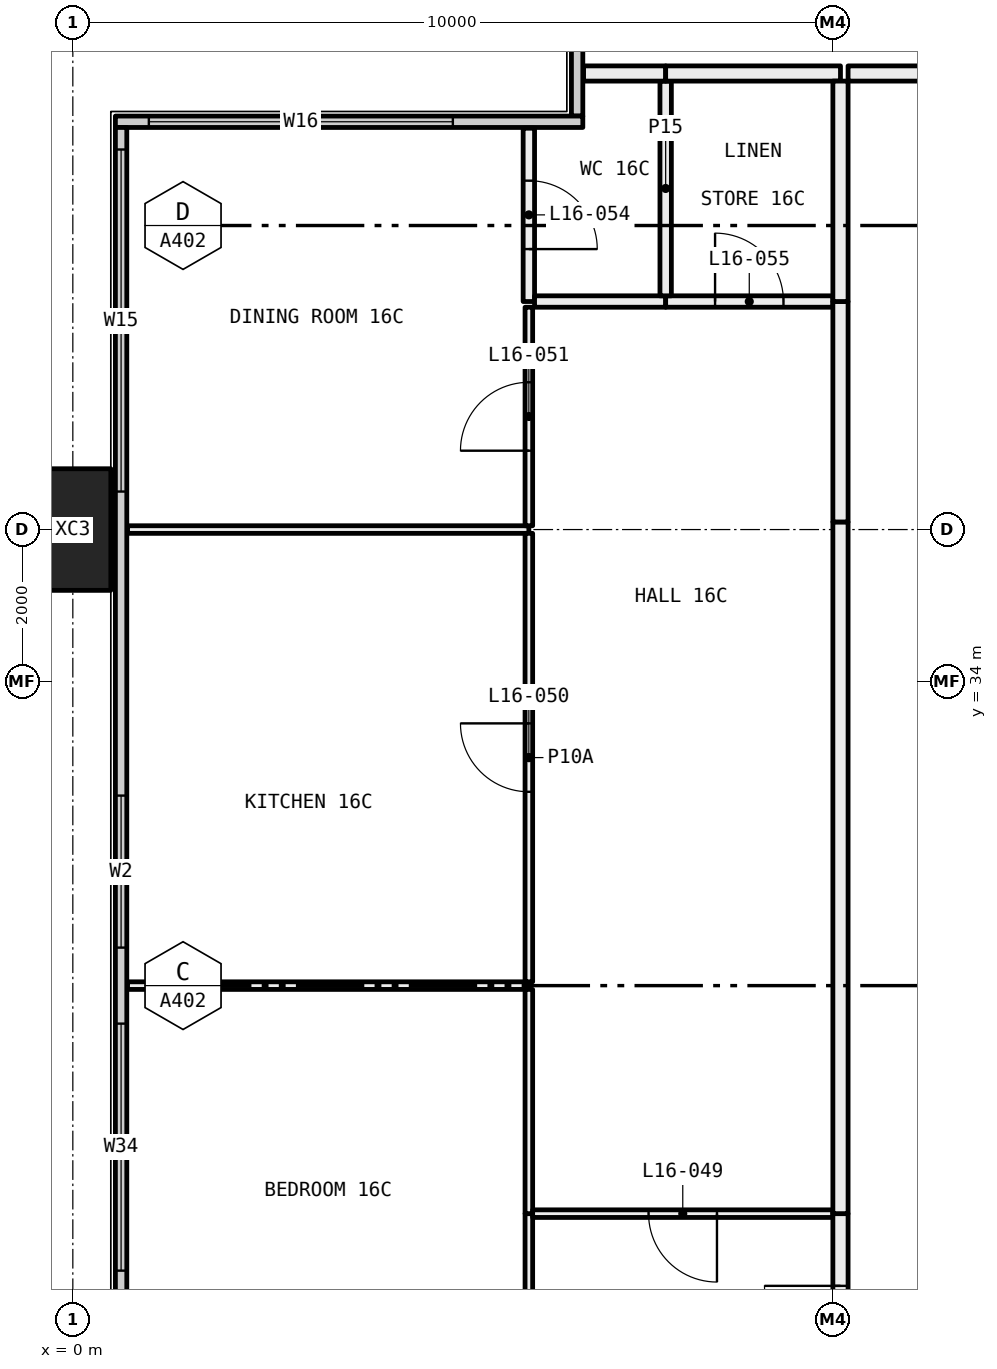
"""IFC4 building model, lengths in metres.
Left out: names, types, materials, properties, quantities, classifications, styles, units other than length and angle.
Written with IfcOpenShell. Run it as: python <this file> out.ifc"""

import sys

from ifc_helpers import new_model, si_unit, direction, frame, frame_2d, origin, origin_2d, place, context, subcontext, project, spatial, rectangle, hollow_rectangle, extrude, element, fill, save


model = new_model("IFC4")
c1 = context("Model", 3, precision=1e-05, world=origin(), true_north=direction((0.0, 1.0)))
c2 = subcontext(c1, "Body", "Model", "MODEL_VIEW")
j1 = project(units=[si_unit("LENGTHUNIT", "METRE"), si_unit("PLANEANGLEUNIT", "RADIAN")], contexts=[c1])
p1 = place(None, origin())
s1 = spatial("IfcSite", under=j1, at=p1, CompositionType="ELEMENT")
p2 = place(p1, origin())
s2 = spatial("IfcBuilding", under=s1, at=p2, CompositionType="ELEMENT")
p3 = place(p2, frame((0.0, 0.0, 67.95)))
s3 = spatial("IfcBuildingStorey", under=s2, at=p3, CompositionType="ELEMENT", Elevation=67.95)
p4 = place(p3, frame((0.0, 36.0, -0.4), z_axis=(0.0, 0.0, 1.0), x_axis=(0.0, 1.0, 0.0)))
e1 = element("IfcColumn", 1, at=p4, inside=s3, PredefinedType="COLUMN", context=c2, shape_type="SweptSolid", body=[
    extrude(hollow_rectangle(XDim=1.6, YDim=1.0, WallThickness=0.065, at=origin_2d()), origin(), (0.0, 0.0, 1.0), 3.45),
])
p5 = place(p3, frame((6.635, 41.44, 0.0), z_axis=(0.0, 0.0, 1.0), x_axis=(0.0, 1.0, 0.0)))
e2 = element("IfcWall", 2, at=p5, inside=s3, PredefinedType="ELEMENTEDWALL", context=c2, shape_type="SweptSolid", body=[
    extrude(rectangle(XDim=5.85, YDim=0.15, at=frame_2d((2.925, 0.0))), origin(), (0.0, 0.0, 1.0), 3.05),
])
p6 = place(p5, frame((1.56, 0.0, 0.45)))
e3 = element("IfcOpeningElement", 3, at=p6, cuts=e2, PredefinedType="OPENING", context=c2, shape_type="SweptSolid", body=[
    extrude(rectangle(XDim=4.0, YDim=2.55, at=frame_2d((2.0, 1.275))), frame((0.0, 0.085, 0.0), z_axis=(0.0, -1.0, 0.0), x_axis=(1.0, 0.0, 0.0)), (0.0, 0.0, 1.0), 0.17),
])
p7 = place(p3, frame((0.56, 41.365, 0.0), z_axis=(0.0, 0.0, 1.0), x_axis=(1.0, 0.0, 0.0)))
e4 = element("IfcWall", 4, at=p7, inside=s3, PredefinedType="ELEMENTEDWALL", context=c2, shape_type="SweptSolid", body=[
    extrude(rectangle(XDim=6.15, YDim=0.15, at=frame_2d((3.075, 0.0))), origin(), (0.0, 0.0, 1.0), 3.05),
])
p8 = place(p7, frame((0.44, 0.0, 0.45)))
e5 = element("IfcOpeningElement", 5, at=p8, cuts=e4, PredefinedType="OPENING", context=c2, shape_type="SweptSolid", body=[
    extrude(rectangle(XDim=4.0, YDim=2.55, at=frame_2d((2.0, 1.275))), frame((0.0, 0.085, 0.0), z_axis=(0.0, -1.0, 0.0), x_axis=(1.0, 0.0, 0.0)), (0.0, 0.0, 1.0), 0.17),
])
p9 = place(p3, frame((0.635, 6.71, 0.0), z_axis=(0.0, 0.0, 1.0), x_axis=(0.0, 1.0, 0.0)))
e6 = element("IfcWall", 6, at=p9, inside=s3, PredefinedType="ELEMENTEDWALL", context=c2, shape_type="SweptSolid", body=[
    extrude(rectangle(XDim=34.58, YDim=0.15, at=frame_2d((17.29, 0.0))), origin(), (0.0, 0.0, 1.0), 3.05),
])
p10 = place(p9, frame((0.29, 0.0, 0.45)))
e7 = element("IfcOpeningElement", 7, at=p10, cuts=e6, PredefinedType="OPENING", context=c2, shape_type="SweptSolid", body=[
    extrude(rectangle(XDim=4.5, YDim=2.55, at=frame_2d((2.25, 1.275))), frame((0.0, 0.085, 0.0), z_axis=(0.0, -1.0, 0.0), x_axis=(1.0, 0.0, 0.0)), (0.0, 0.0, 1.0), 0.17),
])
p11 = place(p9, frame((7.54, 0.0, 0.45)))
e8 = element("IfcOpeningElement", 8, at=p11, cuts=e6, PredefinedType="OPENING", context=c2, shape_type="SweptSolid", body=[
    extrude(rectangle(XDim=3.25, YDim=2.55, at=frame_2d((1.625, 1.275))), frame((0.0, 0.085, 0.0), z_axis=(0.0, -1.0, 0.0), x_axis=(1.0, 0.0, 0.0)), (0.0, 0.0, 1.0), 0.17),
])
p12 = place(p9, frame((11.79, 0.0, 0.45)))
e9 = element("IfcOpeningElement", 9, at=p12, cuts=e6, PredefinedType="OPENING", context=c2, shape_type="SweptSolid", body=[
    extrude(rectangle(XDim=3.25, YDim=2.55, at=frame_2d((1.625, 1.275))), frame((0.0, 0.085, 0.0), z_axis=(0.0, -1.0, 0.0), x_axis=(1.0, 0.0, 0.0)), (0.0, 0.0, 1.0), 0.17),
])
p13 = place(p9, frame((19.54, 0.0, 0.45)))
e10 = element("IfcOpeningElement", 10, at=p13, cuts=e6, PredefinedType="OPENING", context=c2, shape_type="SweptSolid", body=[
    extrude(rectangle(XDim=3.25, YDim=2.55, at=frame_2d((1.625, 1.275))), frame((0.0, 0.085, 0.0), z_axis=(0.0, -1.0, 0.0), x_axis=(1.0, 0.0, 0.0)), (0.0, 0.0, 1.0), 0.17),
])
p14 = place(p9, frame((23.79, 0.0, 0.45)))
e11 = element("IfcOpeningElement", 11, at=p14, cuts=e6, PredefinedType="OPENING", context=c2, shape_type="SweptSolid", body=[
    extrude(rectangle(XDim=2.0, YDim=2.55, at=frame_2d((1.0, 1.275))), frame((0.0, 0.085, 0.0), z_axis=(0.0, -1.0, 0.0), x_axis=(1.0, 0.0, 0.0)), (0.0, 0.0, 1.0), 0.17),
])
p15 = place(p9, frame((29.79, 0.0, 0.45)))
e12 = element("IfcOpeningElement", 12, at=p15, cuts=e6, PredefinedType="OPENING", context=c2, shape_type="SweptSolid", body=[
    extrude(rectangle(XDim=4.5, YDim=2.55, at=frame_2d((2.25, 1.275))), frame((0.0, 0.085, 0.0), z_axis=(0.0, -1.0, 0.0), x_axis=(1.0, 0.0, 0.0)), (0.0, 0.0, 1.0), 0.17),
])
p16 = place(p3, frame((6.0, 30.0, 0.0), z_axis=(0.0, 0.0, 1.0), x_axis=(-1.0, 0.0, 0.0)))
e13 = element("IfcWall", 13, at=p16, inside=s3, PredefinedType="PARTITIONING", context=c2, shape_type="SweptSolid", body=[
    extrude(rectangle(XDim=5.28, YDim=0.1, at=frame_2d((2.64, 0.0))), origin(), (0.0, 0.0, 1.0), 3.05),
])
p17 = place(p3, frame((6.0, 24.05, 0.0), z_axis=(0.0, 0.0, 1.0), x_axis=(0.0, 1.0, 0.0)))
e14 = element("IfcWall", 14, at=p17, inside=s3, PredefinedType="PARTITIONING", context=c2, shape_type="SweptSolid", body=[
    extrude(rectangle(XDim=2.95, YDim=0.1, at=frame_2d((1.475, 0.0))), origin(), (0.0, 0.0, 1.0), 2.45),
])
p18 = place(p3, frame((6.0, 27.0, 0.0), z_axis=(0.0, 0.0, 1.0), x_axis=(0.0, 1.0, 0.0)))
e15 = element("IfcWall", 15, at=p18, inside=s3, PredefinedType="PARTITIONING", context=c2, shape_type="SweptSolid", body=[
    extrude(rectangle(XDim=2.95, YDim=0.1, at=frame_2d((1.475, 0.0))), origin(), (0.0, 0.0, 1.0), 3.05),
])
p19 = place(p3, frame((6.0, 36.0, 0.0), z_axis=(0.0, 0.0, 1.0), x_axis=(-1.0, 0.0, 0.0)))
e16 = element("IfcWall", 16, at=p19, inside=s3, PredefinedType="PARTITIONING", context=c2, shape_type="SweptSolid", body=[
    extrude(rectangle(XDim=5.28, YDim=0.1, at=frame_2d((2.64, 0.0))), origin(), (0.0, 0.0, 1.0), 2.45),
])
p20 = place(p3, frame((6.0, 30.05, 0.0), z_axis=(0.0, 0.0, 1.0), x_axis=(0.0, 1.0, 0.0)))
e17 = element("IfcWall", 17, at=p20, inside=s3, PredefinedType="PARTITIONING", context=c2, shape_type="SweptSolid", body=[
    extrude(rectangle(XDim=5.9, YDim=0.1, at=frame_2d((2.95, 0.0))), origin(), (0.0, 0.0, 1.0), 2.45),
])
p21 = place(p20, frame((2.5, 0.0, 0.0)))
e18 = element("IfcOpeningElement", 18, at=p21, cuts=e17, PredefinedType="OPENING", context=c2, shape_type="SweptSolid", body=[
    extrude(rectangle(XDim=0.9, YDim=2.1, at=frame_2d((0.45, 1.05))), frame((0.0, 0.06, 0.0), z_axis=(0.0, -1.0, 0.0), x_axis=(1.0, 0.0, 0.0)), (0.0, 0.0, 1.0), 0.12),
])
p22 = place(p3, frame((6.0, 36.05, 0.0), z_axis=(0.0, 0.0, 1.0), x_axis=(0.0, 1.0, 0.0)))
e19 = element("IfcWall", 19, at=p22, inside=s3, PredefinedType="PARTITIONING", context=c2, shape_type="SweptSolid", body=[
    extrude(rectangle(XDim=2.875, YDim=0.1, at=frame_2d((1.438, 0.0))), origin(), (0.0, 0.0, 1.0), 2.45),
])
p23 = place(p22, frame((0.988, 0.0, 0.0)))
e20 = element("IfcOpeningElement", 20, at=p23, cuts=e19, PredefinedType="OPENING", context=c2, shape_type="SweptSolid", body=[
    extrude(rectangle(XDim=0.9, YDim=2.1, at=frame_2d((0.45, 1.05))), frame((0.0, 0.06, 0.0), z_axis=(0.0, -1.0, 0.0), x_axis=(1.0, 0.0, 0.0)), (0.0, 0.0, 1.0), 0.12),
])
p24 = place(p3, frame((6.0, 39.0, 0.0), z_axis=(0.0, 0.0, 1.0), x_axis=(0.0, 1.0, 0.0)))
e21 = element("IfcWall", 21, at=p24, inside=s3, PredefinedType="PARTITIONING", context=c2, shape_type="SweptSolid", body=[
    extrude(rectangle(XDim=2.28, YDim=0.15, at=frame_2d((1.14, 0.0))), origin(), (0.0, 0.0, 1.0), 3.05),
])
p25 = place(p24, frame((0.69, 0.0, 0.0)))
e22 = element("IfcOpeningElement", 22, at=p25, cuts=e21, PredefinedType="OPENING", context=c2, shape_type="SweptSolid", body=[
    extrude(rectangle(XDim=0.9, YDim=2.1, at=frame_2d((0.45, 1.05))), frame((0.0, 0.085, 0.0), z_axis=(0.0, -1.0, 0.0), x_axis=(1.0, 0.0, 0.0)), (0.0, 0.0, 1.0), 0.17),
])
p26 = place(p3, frame((10.0, 27.0, 0.0), z_axis=(0.0, 0.0, 1.0), x_axis=(-1.0, 0.0, 0.0)))
e23 = element("IfcWall", 23, at=p26, inside=s3, PredefinedType="PARTITIONING", context=c2, shape_type="SweptSolid", body=[
    extrude(rectangle(XDim=3.95, YDim=0.1, at=frame_2d((1.975, 0.0))), origin(), (0.0, 0.0, 1.0), 3.05),
])
p27 = place(p26, frame((1.525, 0.0, 0.0)))
e24 = element("IfcOpeningElement", 24, at=p27, cuts=e23, PredefinedType="OPENING", context=c2, shape_type="SweptSolid", body=[
    extrude(rectangle(XDim=0.9, YDim=2.1, at=frame_2d((0.45, 1.05))), frame((0.0, 0.06, 0.0), z_axis=(0.0, -1.0, 0.0), x_axis=(1.0, 0.0, 0.0)), (0.0, 0.0, 1.0), 0.12),
])
p28 = place(p3, frame((10.1, 24.1, 0.0), z_axis=(0.0, 0.0, 1.0), x_axis=(0.0, 1.0, 0.0)))
e25 = element("IfcWall", 25, at=p28, inside=s3, PredefinedType="PARTITIONING", context=c2, shape_type="SweptSolid", body=[
    extrude(rectangle(XDim=2.9, YDim=0.2, at=frame_2d((1.45, 0.0))), origin(), (0.0, 0.0, 1.0), 3.05),
])
p29 = place(p28, frame((0.95, 0.0, 0.0)))
e26 = element("IfcOpeningElement", 26, at=p29, cuts=e25, PredefinedType="OPENING", context=c2, shape_type="SweptSolid", body=[
    extrude(rectangle(XDim=1.0, YDim=2.1, at=frame_2d((0.5, 1.05))), frame((0.0, 0.11, 0.0), z_axis=(0.0, -1.0, 0.0), x_axis=(1.0, 0.0, 0.0)), (0.0, 0.0, 1.0), 0.22),
])
p30 = place(p3, frame((7.8, 39.0, 0.0), z_axis=(0.0, 0.0, 1.0), x_axis=(-1.0, 0.0, 0.0)))
e27 = element("IfcWall", 27, at=p30, inside=s3, PredefinedType="PARTITIONING", context=c2, shape_type="SweptSolid", body=[
    extrude(rectangle(XDim=1.725, YDim=0.15, at=frame_2d((0.863, 0.0))), origin(), (0.0, 0.0, 1.0), 3.05),
])
p31 = place(p3, frame((10.0, 39.0, 0.0), z_axis=(0.0, 0.0, 1.0), x_axis=(-1.0, 0.0, 0.0)))
e28 = element("IfcWall", 28, at=p31, inside=s3, PredefinedType="PARTITIONING", context=c2, shape_type="SweptSolid", body=[
    extrude(rectangle(XDim=2.2, YDim=0.15, at=frame_2d((1.1, 0.0))), origin(), (0.0, 0.0, 1.0), 3.05),
])
p32 = place(p31, frame((0.65, 0.0, 0.0)))
e29 = element("IfcOpeningElement", 29, at=p32, cuts=e28, PredefinedType="OPENING", context=c2, shape_type="SweptSolid", body=[
    extrude(rectangle(XDim=0.9, YDim=2.1, at=frame_2d((0.45, 1.05))), frame((0.0, 0.085, 0.0), z_axis=(0.0, -1.0, 0.0), x_axis=(1.0, 0.0, 0.0)), (0.0, 0.0, 1.0), 0.17),
])
p33 = place(p3, frame((10.1, 27.0, 0.0), z_axis=(0.0, 0.0, 1.0), x_axis=(0.0, 1.0, 0.0)))
e30 = element("IfcWall", 30, at=p33, inside=s3, PredefinedType="PARTITIONING", context=c2, shape_type="SweptSolid", body=[
    extrude(rectangle(XDim=9.1, YDim=0.2, at=frame_2d((4.55, 0.0))), origin(), (0.0, 0.0, 1.0), 2.45),
])
p34 = place(p3, frame((10.1, 36.1, 0.0), z_axis=(0.0, 0.0, 1.0), x_axis=(0.0, 1.0, 0.0)))
e31 = element("IfcWall", 31, at=p34, inside=s3, PredefinedType="PARTITIONING", context=c2, shape_type="SweptSolid", body=[
    extrude(rectangle(XDim=2.9, YDim=0.2, at=frame_2d((1.45, 0.0))), origin(), (0.0, 0.0, 1.0), 3.05),
])
p35 = place(p3, frame((7.8, 39.075, 0.0), z_axis=(0.0, 0.0, 1.0), x_axis=(0.0, 1.0, 0.0)))
e32 = element("IfcWall", 32, at=p35, inside=s3, PredefinedType="PARTITIONING", context=c2, shape_type="SweptSolid", body=[
    extrude(rectangle(XDim=2.825, YDim=0.15, at=frame_2d((1.413, 0.0))), origin(), (0.0, 0.0, 1.0), 3.05),
])
p36 = place(p3, frame((7.8, 42.0, 0.0), z_axis=(0.0, 0.0, 1.0), x_axis=(-1.0, 0.0, 0.0)))
e33 = element("IfcWall", 33, at=p36, inside=s3, PredefinedType="PARTITIONING", context=c2, shape_type="SweptSolid", body=[
    extrude(rectangle(XDim=1.08, YDim=0.2, at=frame_2d((0.54, 0.0))), origin(), (0.0, 0.0, 1.0), 3.05),
])
p37 = place(p3, frame((10.1, 42.0, 0.0), z_axis=(0.0, 0.0, 1.0), x_axis=(-1.0, 0.0, 0.0)))
e34 = element("IfcWall", 34, at=p37, inside=s3, PredefinedType="PARTITIONING", context=c2, shape_type="SweptSolid", body=[
    extrude(rectangle(XDim=2.3, YDim=0.2, at=frame_2d((1.15, 0.0))), origin(), (0.0, 0.0, 1.0), 3.05),
])
p38 = place(p3, frame((10.1, 39.0, 0.0), z_axis=(0.0, 0.0, 1.0), x_axis=(0.0, 1.0, 0.0)))
e35 = element("IfcWall", 35, at=p38, inside=s3, PredefinedType="PARTITIONING", context=c2, shape_type="SweptSolid", body=[
    extrude(rectangle(XDim=2.9, YDim=0.2, at=frame_2d((1.45, 0.0))), origin(), (0.0, 0.0, 1.0), 3.05),
])
p39 = place(p3, frame((10.2, 42.0, 0.0), z_axis=(0.0, 0.0, 1.0), x_axis=(1.0, 0.0, 0.0)))
e36 = element("IfcWall", 36, at=p39, inside=s3, PredefinedType="PARTITIONING", context=c2, shape_type="SweptSolid", body=[
    extrude(rectangle(XDim=1.8, YDim=0.2, at=frame_2d((0.9, 0.0))), origin(), (0.0, 0.0, 1.0), 3.05),
])
p40 = place(p8, origin())
e37 = element("IfcWindow", 37, at=p40, inside=s3, PartitioningType="SINGLE_PANEL", PredefinedType="WINDOW", context=c2, shape_type="SweptSolid", body=[
    extrude(rectangle(XDim=4.0, YDim=2.55, at=frame_2d((2.0, 1.275))), frame((0.0, 0.03, 0.0), z_axis=(0.0, -1.0, 0.0), x_axis=(1.0, 0.0, 0.0)), (0.0, 0.0, 1.0), 0.06),
])
fill(e5, e37)
p41 = place(p13, origin())
e38 = element("IfcWindow", 38, at=p41, inside=s3, PartitioningType="SINGLE_PANEL", PredefinedType="WINDOW", context=c2, shape_type="SweptSolid", body=[
    extrude(rectangle(XDim=3.25, YDim=2.55, at=frame_2d((1.625, 1.275))), frame((0.0, 0.03, 0.0), z_axis=(0.0, -1.0, 0.0), x_axis=(1.0, 0.0, 0.0)), (0.0, 0.0, 1.0), 0.06),
])
fill(e10, e38)
p42 = place(p14, origin())
e39 = element("IfcWindow", 39, at=p42, inside=s3, PartitioningType="SINGLE_PANEL", PredefinedType="WINDOW", context=c2, shape_type="SweptSolid", body=[
    extrude(rectangle(XDim=2.0, YDim=2.55, at=frame_2d((1.0, 1.275))), frame((0.0, 0.03, 0.0), z_axis=(0.0, -1.0, 0.0), x_axis=(1.0, 0.0, 0.0)), (0.0, 0.0, 1.0), 0.06),
])
fill(e11, e39)
p43 = place(p15, origin())
e40 = element("IfcWindow", 40, at=p43, inside=s3, PartitioningType="SINGLE_PANEL", PredefinedType="WINDOW", context=c2, shape_type="SweptSolid", body=[
    extrude(rectangle(XDim=4.5, YDim=2.55, at=frame_2d((2.25, 1.275))), frame((0.0, 0.03, 0.0), z_axis=(0.0, -1.0, 0.0), x_axis=(1.0, 0.0, 0.0)), (0.0, 0.0, 1.0), 0.06),
])
fill(e12, e40)
p44 = place(p29, origin())
e41 = element("IfcDoor", 41, at=p44, inside=s3, OperationType="SINGLE_SWING_LEFT", PredefinedType="DOOR", context=c2, shape_type="SweptSolid", body=[
    extrude(rectangle(XDim=1.0, YDim=2.1, at=frame_2d((0.5, 1.05))), frame((0.0, 0.025, 0.0), z_axis=(0.0, -1.0, 0.0), x_axis=(1.0, 0.0, 0.0)), (0.0, 0.0, 1.0), 0.05),
])
fill(e26, e41)
p45 = place(p27, origin())
e42 = element("IfcDoor", 42, at=p45, inside=s3, OperationType="SINGLE_SWING_RIGHT", PredefinedType="DOOR", context=c2, shape_type="SweptSolid", body=[
    extrude(rectangle(XDim=0.9, YDim=2.1, at=frame_2d((0.45, 1.05))), frame((0.0, 0.025, 0.0), z_axis=(0.0, -1.0, 0.0), x_axis=(1.0, 0.0, 0.0)), (0.0, 0.0, 1.0), 0.05),
])
fill(e24, e42)
p46 = place(p21, origin())
e43 = element("IfcDoor", 43, at=p46, inside=s3, OperationType="SINGLE_SWING_LEFT", PredefinedType="DOOR", context=c2, shape_type="SweptSolid", body=[
    extrude(rectangle(XDim=0.9, YDim=2.1, at=frame_2d((0.45, 1.05))), frame((0.0, 0.025, 0.0), z_axis=(0.0, -1.0, 0.0), x_axis=(1.0, 0.0, 0.0)), (0.0, 0.0, 1.0), 0.05),
])
fill(e18, e43)
p47 = place(p23, origin())
e44 = element("IfcDoor", 44, at=p47, inside=s3, OperationType="SINGLE_SWING_RIGHT", PredefinedType="DOOR", context=c2, shape_type="SweptSolid", body=[
    extrude(rectangle(XDim=0.9, YDim=2.1, at=frame_2d((0.45, 1.05))), frame((0.0, 0.025, 0.0), z_axis=(0.0, -1.0, 0.0), x_axis=(1.0, 0.0, 0.0)), (0.0, 0.0, 1.0), 0.05),
])
fill(e20, e44)
p48 = place(p25, frame((0.9, 0.0, 0.0), x_axis=(-1.0, 0.0, 0.0)))
e45 = element("IfcDoor", 45, at=p48, inside=s3, OperationType="SINGLE_SWING_LEFT", PredefinedType="DOOR", context=c2, shape_type="SweptSolid", body=[
    extrude(rectangle(XDim=0.9, YDim=2.1, at=frame_2d((0.45, 1.05))), frame((0.0, 0.025, 0.0), z_axis=(0.0, -1.0, 0.0), x_axis=(1.0, 0.0, 0.0)), (0.0, 0.0, 1.0), 0.05),
])
fill(e22, e45)
p49 = place(p32, frame((0.9, 0.0, 0.0), x_axis=(-1.0, 0.0, 0.0)))
e46 = element("IfcDoor", 46, at=p49, inside=s3, OperationType="SINGLE_SWING_RIGHT", PredefinedType="DOOR", context=c2, shape_type="SweptSolid", body=[
    extrude(rectangle(XDim=0.9, YDim=2.1, at=frame_2d((0.45, 1.05))), frame((0.0, 0.025, 0.0), z_axis=(0.0, -1.0, 0.0), x_axis=(1.0, 0.0, 0.0)), (0.0, 0.0, 1.0), 0.05),
])
fill(e29, e46)
save(model, sys.argv[1])
